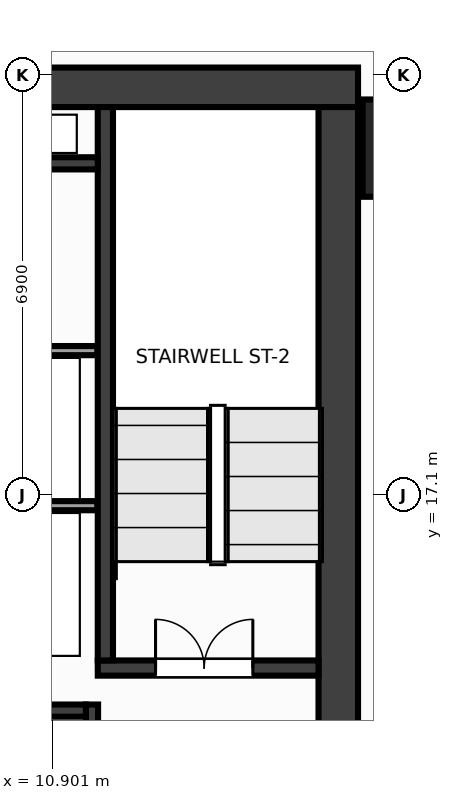
"""IFC4 building model, lengths in metres.
Left out: names, types, materials, properties, quantities, classifications, styles, units other than length and angle.
Written with IfcOpenShell. Run it as: python <this file> out.ifc"""

import sys

from ifc_helpers import new_model, si_unit, direction, frame, frame_2d, origin, origin_2d, place, context, subcontext, project, spatial, rectangle, extrude, source, transform, mapped, element, fill, save


model = new_model("IFC4")
c1 = context("Model", 3, precision=1e-05, world=origin(), true_north=direction((0.0, 1.0)))
c2 = subcontext(c1, "Body", "Model", "MODEL_VIEW")
j1 = project(units=[si_unit("LENGTHUNIT", "METRE"), si_unit("PLANEANGLEUNIT", "RADIAN")], contexts=[c1])
p1 = place(None, origin())
s1 = spatial("IfcSite", under=j1, at=p1, CompositionType="ELEMENT")
p2 = place(p1, origin())
s2 = spatial("IfcBuilding", under=s1, at=p2, CompositionType="ELEMENT")
p3 = place(p2, frame((0.0, 0.0, 106.4)))
s3 = spatial("IfcBuildingStorey", under=s2, at=p3, CompositionType="ELEMENT", Elevation=106.4)
m1 = source(origin(), c2, "Body", "SweptSolid", [
    extrude(rectangle(XDim=31.85, YDim=0.65, at=frame_2d((15.925, 0.0))), origin(), (0.0, 0.0, 1.0), 3.6),
])
p4 = place(p3, frame((-15.925, 23.8, 0.0), z_axis=(0.0, 0.0, 1.0), x_axis=(1.0, 0.0, 0.0)))
e1 = element("IfcWall", 1, at=p4, inside=s3, PredefinedType="SHEAR", context=c2, shape_type="MappedRepresentation", body=[
    mapped(m1, transform((0.0, 0.0, 0.0), x_axis=(1.0, 0.0, 0.0), y_axis=(0.0, 1.0, 0.0), z_axis=(0.0, 0.0, 1.0), scale=1.0)),
])
m2 = source(origin(), c2, "Body", "SweptSolid", [
    extrude(rectangle(XDim=12.95, YDim=0.65, at=frame_2d((6.475, 0.0))), origin(), (0.0, 0.0, 1.0), 3.6),
])
p5 = place(p3, frame((15.6, 10.525, 0.0), z_axis=(0.0, 0.0, 1.0), x_axis=(0.0, 1.0, 0.0)))
e2 = element("IfcWall", 2, at=p5, inside=s3, PredefinedType="SHEAR", context=c2, shape_type="MappedRepresentation", body=[
    mapped(m2, transform((0.0, 0.0, 0.0), x_axis=(1.0, 0.0, 0.0), y_axis=(0.0, 1.0, 0.0), z_axis=(0.0, 0.0, 1.0), scale=1.0)),
])
m3 = source(origin(), c2, "Body", "SweptSolid", [
    extrude(rectangle(XDim=3.63, YDim=0.25, at=frame_2d((1.815, 0.0))), origin(), (0.0, 0.0, 1.0), 3.6),
])
p6 = place(p3, frame((11.645, 14.25, 0.0), z_axis=(0.0, 0.0, 1.0), x_axis=(1.0, 0.0, 0.0)))
e3 = element("IfcWall", 3, at=p6, inside=s3, PredefinedType="SHEAR", context=c2, shape_type="MappedRepresentation", body=[
    mapped(m3, transform((0.0, 0.0, 0.0), x_axis=(1.0, 0.0, 0.0), y_axis=(0.0, 1.0, 0.0), z_axis=(0.0, 0.0, 1.0), scale=1.0)),
])
p7 = place(p6, frame((0.95, 0.0, 0.0)))
e4 = element("IfcOpeningElement", 4, at=p7, cuts=e3, PredefinedType="OPENING", context=c2, shape_type="SweptSolid", body=[
    extrude(rectangle(XDim=1.6, YDim=2.15, at=frame_2d((0.8, 1.075))), frame((0.0, 0.137, 0.0), z_axis=(0.0, -1.0, 0.0), x_axis=(1.0, 0.0, 0.0)), (0.0, 0.0, 1.0), 0.274),
])
m4 = source(origin(), c2, "Body", "SweptSolid", [
    extrude(rectangle(XDim=9.1, YDim=0.25, at=frame_2d((4.55, 0.0))), origin(), (0.0, 0.0, 1.0), 3.6),
])
p8 = place(p3, frame((11.77, 14.375, 0.0), z_axis=(0.0, 0.0, 1.0), x_axis=(0.0, 1.0, 0.0)))
e5 = element("IfcWall", 5, at=p8, inside=s3, PredefinedType="SHEAR", context=c2, shape_type="MappedRepresentation", body=[
    mapped(m4, transform((0.0, 0.0, 0.0), x_axis=(1.0, 0.0, 0.0), y_axis=(0.0, 1.0, 0.0), z_axis=(0.0, 0.0, 1.0), scale=1.0)),
])
m5 = source(origin(), c2, "Body", "SweptSolid", [
    extrude(rectangle(XDim=3.125, YDim=0.2, at=frame_2d((1.562, 0.0))), origin(), (0.0, 0.0, 1.0), 3.6),
])
p9 = place(p3, frame((11.55, 10.525, 0.0), z_axis=(0.0, 0.0, 1.0), x_axis=(0.0, 1.0, 0.0)))
e6 = element("IfcWall", 6, at=p9, inside=s3, PredefinedType="SHEAR", context=c2, shape_type="MappedRepresentation", body=[
    mapped(m5, transform((0.0, 0.0, 0.0), x_axis=(1.0, 0.0, 0.0), y_axis=(0.0, 1.0, 0.0), z_axis=(0.0, 0.0, 1.0), scale=1.0)),
])
p10 = place(p9, frame((0.9, 0.0, 0.0)))
e7 = element("IfcOpeningElement", 7, at=p10, cuts=e6, PredefinedType="OPENING", context=c2, shape_type="SweptSolid", body=[
    extrude(rectangle(XDim=1.1, YDim=2.15, at=frame_2d((0.55, 1.075))), frame((0.0, 0.112, 0.0), z_axis=(0.0, -1.0, 0.0), x_axis=(1.0, 0.0, 0.0)), (0.0, 0.0, 1.0), 0.224),
])
m6 = source(origin(), c2, "Body", "SweptSolid", [
    extrude(rectangle(XDim=2.825, YDim=0.2, at=frame_2d((1.413, 0.0))), origin(), (0.0, 0.0, 1.0), 3.6),
])
p11 = place(p3, frame((8.625, 13.55, 0.0), z_axis=(0.0, 0.0, 1.0), x_axis=(1.0, 0.0, 0.0)))
e8 = element("IfcWall", 8, at=p11, inside=s3, PredefinedType="SHEAR", context=c2, shape_type="MappedRepresentation", body=[
    mapped(m6, transform((0.0, 0.0, 0.0), x_axis=(1.0, 0.0, 0.0), y_axis=(0.0, 1.0, 0.0), z_axis=(0.0, 0.0, 1.0), scale=1.0)),
])
m7 = source(origin(), c2, "Body", "SweptSolid", [
    extrude(rectangle(XDim=3.02, YDim=0.2, at=frame_2d((1.51, 0.0))), origin(), (0.0, 0.0, 1.0), 3.6),
])
p12 = place(p3, frame((8.625, 22.55, 0.0), z_axis=(0.0, 0.0, 1.0), x_axis=(1.0, 0.0, 0.0)))
e9 = element("IfcWall", 9, at=p12, inside=s3, PredefinedType="SHEAR", context=c2, shape_type="MappedRepresentation", body=[
    mapped(m7, transform((0.0, 0.0, 0.0), x_axis=(1.0, 0.0, 0.0), y_axis=(0.0, 1.0, 0.0), z_axis=(0.0, 0.0, 1.0), scale=1.0)),
])
m8 = source(origin(), c2, "Body", "SweptSolid", [
    extrude(rectangle(XDim=1.6, YDim=1.6, at=origin_2d()), origin(), (0.0, 0.0, 1.0), 3.6),
])
p13 = place(p3, frame((16.8, 22.8, 0.0), z_axis=(0.0, 0.0, 1.0), x_axis=(1.0, 0.0, 0.0)))
e10 = element("IfcColumn", 10, at=p13, inside=s3, PredefinedType="COLUMN", context=c2, shape_type="MappedRepresentation", body=[
    mapped(m8, transform((0.0, 0.0, 0.0), x_axis=(1.0, 0.0, 0.0), y_axis=(0.0, 1.0, 0.0), z_axis=(0.0, 0.0, 1.0), scale=1.0)),
])
m9 = source(origin(), c2, "Body", "SweptSolid", [
    extrude(rectangle(XDim=3.01, YDim=0.15, at=frame_2d((1.505, 0.0))), origin(), (0.0, 0.0, 1.0), 3.36),
])
for number, where, z_axis, x_axis in (
    (11, (8.63, 16.92, 0.0), (0.0, 0.0, 1.0), (1.0, 0.0, 0.0)),
    (12, (8.63, 19.47, 0.0), (0.0, 0.0, 1.0), (1.0, 0.0, 0.0)),
):
    element("IfcWall", number, at=place(p3, frame(where, z_axis=z_axis, x_axis=x_axis)), inside=s3, PredefinedType="PARTITIONING", context=c2, shape_type="MappedRepresentation", body=[
        mapped(m9, transform((0.0, 0.0, 0.0), x_axis=(1.0, 0.0, 0.0), y_axis=(0.0, 1.0, 0.0), z_axis=(0.0, 0.0, 1.0), scale=1.0)),
    ])
m10 = source(origin(), c2, "Body", "SweptSolid", [
    extrude(rectangle(XDim=1.6, YDim=2.15, at=frame_2d((0.8, 1.075))), frame((0.0, 0.025, 0.0), z_axis=(0.0, -1.0, 0.0), x_axis=(1.0, 0.0, 0.0)), (0.0, 0.0, 1.0), 0.05),
])
p14 = place(p7, origin())
e13 = element("IfcDoor", 13, at=p14, inside=s3, OperationType="DOUBLE_DOOR_SINGLE_SWING", PredefinedType="DOOR", context=c2, shape_type="MappedRepresentation", body=[
    mapped(m10, transform((0.0, 0.0, 0.0), x_axis=(1.0, 0.0, 0.0), y_axis=(0.0, 1.0, 0.0), z_axis=(0.0, 0.0, 1.0), scale=1.0)),
])
fill(e4, e13)
save(model, sys.argv[1])
